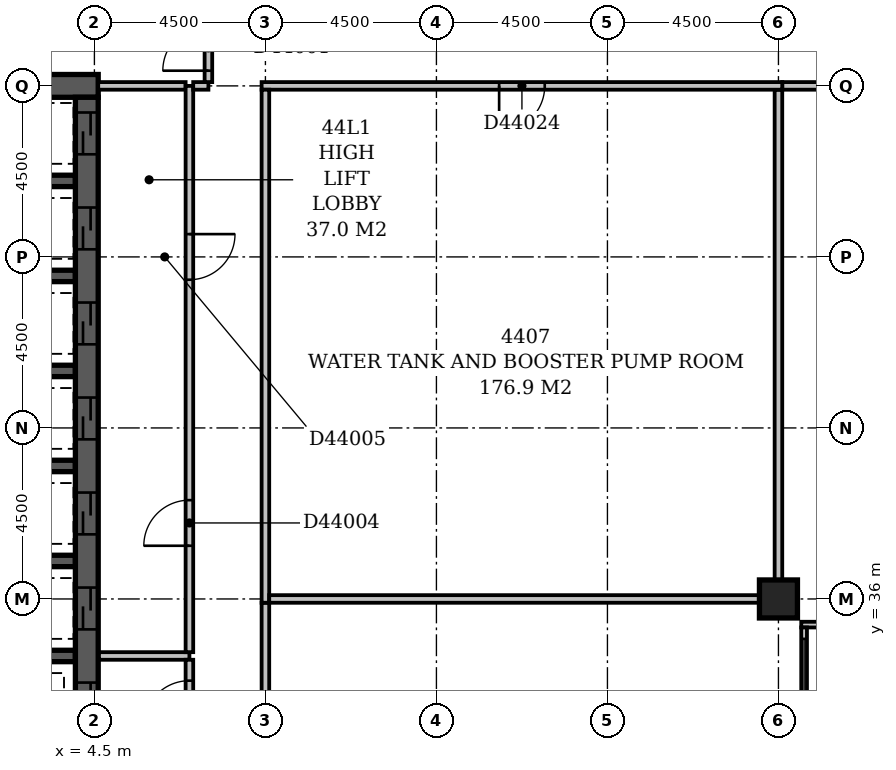
"""IFC4 building model, lengths in metres.
Left out: names, types, materials, properties, quantities, classifications, styles, units other than length and angle.
Written with IfcOpenShell. Run it as: python <this file> out.ifc"""

import sys

from ifc_helpers import new_model, si_unit, direction, frame, frame_2d, origin, origin_2d, place, context, subcontext, project, spatial, rectangle, extrude, element, fill, save


model = new_model("IFC4")
c1 = context("Model", 3, precision=1e-05, world=origin(), true_north=direction((0.0, 1.0)))
c2 = subcontext(c1, "Body", "Model", "MODEL_VIEW")
j1 = project(units=[si_unit("LENGTHUNIT", "METRE"), si_unit("PLANEANGLEUNIT", "RADIAN")], contexts=[c1])
p1 = place(None, origin())
s1 = spatial("IfcSite", under=j1, at=p1, CompositionType="ELEMENT")
p2 = place(p1, origin())
s2 = spatial("IfcBuilding", under=s1, at=p2, CompositionType="ELEMENT")
p3 = place(p2, frame((0.0, 0.0, 173.6)))
s3 = spatial("IfcBuildingStorey", under=s2, at=p3, CompositionType="ELEMENT", Elevation=173.6)
p4 = place(p3, frame((0.2, 49.5, -0.45), z_axis=(0.0, 0.0, 1.0), x_axis=(1.0, 0.0, 0.0)))
e1 = element("IfcWall", 1, at=p4, inside=s3, PredefinedType="SHEAR", context=c2, shape_type="SweptSolid", body=[
    extrude(rectangle(XDim=4.4, YDim=0.6, at=frame_2d((2.2, 0.0))), origin(), (0.0, 0.0, 1.0), 5.55),
])
for number, where, z_axis, x_axis in (
    (2, (0.8, 34.5, -0.45), (0.0, 0.0, 1.0), (1.0, 0.0, 0.0)),
    (3, (0.8, 37.0, -0.45), (0.0, 0.0, 1.0), (1.0, 0.0, 0.0)),
    (4, (0.8, 39.5, -0.45), (0.0, 0.0, 1.0), (1.0, 0.0, 0.0)),
    (5, (0.8, 42.0, -0.45), (0.0, 0.0, 1.0), (1.0, 0.0, 0.0)),
    (6, (0.8, 44.5, -0.45), (0.0, 0.0, 1.0), (1.0, 0.0, 0.0)),
    (7, (0.8, 47.0, -0.45), (0.0, 0.0, 1.0), (1.0, 0.0, 0.0)),
):
    element("IfcWall", number, at=place(p3, frame(where, z_axis=z_axis, x_axis=x_axis)), inside=s3, PredefinedType="SHEAR", context=c2, shape_type="SweptSolid", body=[
        extrude(rectangle(XDim=3.2, YDim=0.3, at=frame_2d((1.6, 0.0))), origin(), (0.0, 0.0, 1.0), 5.55),
    ])
p5 = place(p3, frame((4.3, 27.15, -0.45), z_axis=(0.0, 0.0, 1.0), x_axis=(0.0, 1.0, 0.0)))
e8 = element("IfcWall", 8, at=p5, inside=s3, PredefinedType="SHEAR", context=c2, shape_type="SweptSolid", body=[
    extrude(rectangle(XDim=22.05, YDim=0.6, at=frame_2d((11.025, 0.0))), origin(), (0.0, 0.0, 1.0), 5.55),
])
p6 = place(p5, frame((3.05, 0.0, 0.45)))
e9 = element("IfcOpeningElement", 9, at=p6, cuts=e8, PredefinedType="OPENING", context=c2, shape_type="SweptSolid", body=[
    extrude(rectangle(XDim=1.1, YDim=2.1, at=frame_2d((0.55, 1.05))), frame((0.0, 0.312, 0.0), z_axis=(0.0, -1.0, 0.0), x_axis=(1.0, 0.0, 0.0)), (0.0, 0.0, 1.0), 0.624),
])
p7 = place(p5, frame((0.55, 0.0, 0.45)))
e10 = element("IfcOpeningElement", 10, at=p7, cuts=e8, PredefinedType="OPENING", context=c2, shape_type="SweptSolid", body=[
    extrude(rectangle(XDim=1.1, YDim=2.1, at=frame_2d((0.55, 1.05))), frame((0.0, 0.312, 0.0), z_axis=(0.0, -1.0, 0.0), x_axis=(1.0, 0.0, 0.0)), (0.0, 0.0, 1.0), 0.624),
])
p8 = place(p5, frame((20.55, 0.0, 0.45)))
e11 = element("IfcOpeningElement", 11, at=p8, cuts=e8, PredefinedType="OPENING", context=c2, shape_type="SweptSolid", body=[
    extrude(rectangle(XDim=1.1, YDim=2.1, at=frame_2d((0.55, 1.05))), frame((0.0, 0.312, 0.0), z_axis=(0.0, -1.0, 0.0), x_axis=(1.0, 0.0, 0.0)), (0.0, 0.0, 1.0), 0.624),
])
p9 = place(p5, frame((18.05, 0.0, 0.45)))
e12 = element("IfcOpeningElement", 12, at=p9, cuts=e8, PredefinedType="OPENING", context=c2, shape_type="SweptSolid", body=[
    extrude(rectangle(XDim=1.1, YDim=2.1, at=frame_2d((0.55, 1.05))), frame((0.0, 0.312, 0.0), z_axis=(0.0, -1.0, 0.0), x_axis=(1.0, 0.0, 0.0)), (0.0, 0.0, 1.0), 0.624),
])
p10 = place(p5, frame((15.55, 0.0, 0.45)))
e13 = element("IfcOpeningElement", 13, at=p10, cuts=e8, PredefinedType="OPENING", context=c2, shape_type="SweptSolid", body=[
    extrude(rectangle(XDim=1.1, YDim=2.1, at=frame_2d((0.55, 1.05))), frame((0.0, 0.312, 0.0), z_axis=(0.0, -1.0, 0.0), x_axis=(1.0, 0.0, 0.0)), (0.0, 0.0, 1.0), 0.624),
])
p11 = place(p5, frame((13.05, 0.0, 0.45)))
e14 = element("IfcOpeningElement", 14, at=p11, cuts=e8, PredefinedType="OPENING", context=c2, shape_type="SweptSolid", body=[
    extrude(rectangle(XDim=1.1, YDim=2.1, at=frame_2d((0.55, 1.05))), frame((0.0, 0.312, 0.0), z_axis=(0.0, -1.0, 0.0), x_axis=(1.0, 0.0, 0.0)), (0.0, 0.0, 1.0), 0.624),
])
p12 = place(p5, frame((10.55, 0.0, 0.45)))
e15 = element("IfcOpeningElement", 15, at=p12, cuts=e8, PredefinedType="OPENING", context=c2, shape_type="SweptSolid", body=[
    extrude(rectangle(XDim=1.1, YDim=2.1, at=frame_2d((0.55, 1.05))), frame((0.0, 0.312, 0.0), z_axis=(0.0, -1.0, 0.0), x_axis=(1.0, 0.0, 0.0)), (0.0, 0.0, 1.0), 0.624),
])
p13 = place(p5, frame((8.05, 0.0, 0.45)))
e16 = element("IfcOpeningElement", 16, at=p13, cuts=e8, PredefinedType="OPENING", context=c2, shape_type="SweptSolid", body=[
    extrude(rectangle(XDim=1.1, YDim=2.1, at=frame_2d((0.55, 1.05))), frame((0.0, 0.312, 0.0), z_axis=(0.0, -1.0, 0.0), x_axis=(1.0, 0.0, 0.0)), (0.0, 0.0, 1.0), 0.624),
])
p14 = place(p5, frame((5.55, 0.0, 0.45)))
e17 = element("IfcOpeningElement", 17, at=p14, cuts=e8, PredefinedType="OPENING", context=c2, shape_type="SweptSolid", body=[
    extrude(rectangle(XDim=1.1, YDim=2.1, at=frame_2d((0.55, 1.05))), frame((0.0, 0.312, 0.0), z_axis=(0.0, -1.0, 0.0), x_axis=(1.0, 0.0, 0.0)), (0.0, 0.0, 1.0), 0.624),
])
p15 = place(p3, frame((22.5, 36.0, -0.45), z_axis=(0.0, 0.0, 1.0), x_axis=(1.0, 0.0, 0.0)))
e18 = element("IfcColumn", 18, at=p15, inside=s3, PredefinedType="COLUMN", context=c2, shape_type="SweptSolid", body=[
    extrude(rectangle(XDim=1.0, YDim=1.0, at=origin_2d()), origin(), (0.0, 0.0, 1.0), 5.55),
])
p16 = place(p3, frame((23.175, 17.4, 0.0), z_axis=(0.0, 0.0, 1.0), x_axis=(0.0, 1.0, 0.0)))
e19 = element("IfcWall", 19, at=p16, inside=s3, PredefinedType="STANDARD", context=c2, shape_type="SweptSolid", body=[
    extrude(rectangle(XDim=17.85, YDim=0.15, at=frame_2d((8.925, 0.0))), origin(), (0.0, 0.0, 1.0), 4.5),
])
p17 = place(p16, frame((3.775, 0.0, 0.6)))
e20 = element("IfcOpeningElement", 20, at=p17, cuts=e19, PredefinedType="OPENING", context=c2, shape_type="SweptSolid", body=[
    extrude(rectangle(XDim=0.6, YDim=2.4, at=frame_2d((0.3, 1.2))), frame((0.0, 0.087, 0.0), z_axis=(0.0, -1.0, 0.0), x_axis=(1.0, 0.0, 0.0)), (0.0, 0.0, 1.0), 0.174),
])
p18 = place(p16, frame((5.884, 0.0, 0.6)))
e21 = element("IfcOpeningElement", 21, at=p18, cuts=e19, PredefinedType="OPENING", context=c2, shape_type="SweptSolid", body=[
    extrude(rectangle(XDim=0.9, YDim=2.4, at=frame_2d((0.45, 1.2))), frame((0.0, 0.087, 0.0), z_axis=(0.0, -1.0, 0.0), x_axis=(1.0, 0.0, 0.0)), (0.0, 0.0, 1.0), 0.174),
])
p19 = place(p16, frame((12.775, 0.0, 0.6)))
e22 = element("IfcOpeningElement", 22, at=p19, cuts=e19, PredefinedType="OPENING", context=c2, shape_type="SweptSolid", body=[
    extrude(rectangle(XDim=0.6, YDim=2.4, at=frame_2d((0.3, 1.2))), frame((0.0, 0.087, 0.0), z_axis=(0.0, -1.0, 0.0), x_axis=(1.0, 0.0, 0.0)), (0.0, 0.0, 1.0), 0.174),
])
p20 = place(p16, frame((15.15, 0.0, 0.6)))
e23 = element("IfcOpeningElement", 23, at=p20, cuts=e19, PredefinedType="OPENING", context=c2, shape_type="SweptSolid", body=[
    extrude(rectangle(XDim=2.4, YDim=2.4, at=frame_2d((1.2, 1.2))), frame((0.0, 0.087, 0.0), z_axis=(0.0, -1.0, 0.0), x_axis=(1.0, 0.0, 0.0)), (0.0, 0.0, 1.0), 0.174),
])
p21 = place(p3, frame((23.1, 35.325, 0.0), z_axis=(0.0, 0.0, 1.0), x_axis=(1.0, 0.0, 0.0)))
e24 = element("IfcWall", 24, at=p21, inside=s3, PredefinedType="STANDARD", context=c2, shape_type="SweptSolid", body=[
    extrude(rectangle(XDim=45.15, YDim=0.15, at=frame_2d((22.575, 0.0))), origin(), (0.0, 0.0, 1.0), 4.5),
])
p22 = place(p21, frame((2.575, 0.0, 0.6)))
e25 = element("IfcOpeningElement", 25, at=p22, cuts=e24, PredefinedType="OPENING", context=c2, shape_type="SweptSolid", body=[
    extrude(rectangle(XDim=0.6, YDim=2.4, at=frame_2d((0.3, 1.2))), frame((0.0, 0.087, 0.0), z_axis=(0.0, -1.0, 0.0), x_axis=(1.0, 0.0, 0.0)), (0.0, 0.0, 1.0), 0.174),
])
p23 = place(p21, frame((6.781, 0.0, 0.6)))
e26 = element("IfcOpeningElement", 26, at=p23, cuts=e24, PredefinedType="OPENING", context=c2, shape_type="SweptSolid", body=[
    extrude(rectangle(XDim=0.9, YDim=2.4, at=frame_2d((0.45, 1.2))), frame((0.0, 0.087, 0.0), z_axis=(0.0, -1.0, 0.0), x_axis=(1.0, 0.0, 0.0)), (0.0, 0.0, 1.0), 0.174),
])
p24 = place(p21, frame((11.575, 0.0, 0.6)))
e27 = element("IfcOpeningElement", 27, at=p24, cuts=e24, PredefinedType="OPENING", context=c2, shape_type="SweptSolid", body=[
    extrude(rectangle(XDim=0.6, YDim=2.4, at=frame_2d((0.3, 1.2))), frame((0.0, 0.087, 0.0), z_axis=(0.0, -1.0, 0.0), x_axis=(1.0, 0.0, 0.0)), (0.0, 0.0, 1.0), 0.174),
])
p25 = place(p21, frame((13.95, 0.0, 0.6)))
e28 = element("IfcOpeningElement", 28, at=p25, cuts=e24, PredefinedType="OPENING", context=c2, shape_type="SweptSolid", body=[
    extrude(rectangle(XDim=2.4, YDim=2.4, at=frame_2d((1.2, 1.2))), frame((0.0, 0.087, 0.0), z_axis=(0.0, -1.0, 0.0), x_axis=(1.0, 0.0, 0.0)), (0.0, 0.0, 1.0), 0.174),
])
p26 = place(p21, frame((22.95, 0.0, 0.6)))
e29 = element("IfcOpeningElement", 29, at=p26, cuts=e24, PredefinedType="OPENING", context=c2, shape_type="SweptSolid", body=[
    extrude(rectangle(XDim=2.4, YDim=2.4, at=frame_2d((1.2, 1.2))), frame((0.0, 0.087, 0.0), z_axis=(0.0, -1.0, 0.0), x_axis=(1.0, 0.0, 0.0)), (0.0, 0.0, 1.0), 0.174),
])
p27 = place(p21, frame((29.575, 0.0, 0.6)))
e30 = element("IfcOpeningElement", 30, at=p27, cuts=e24, PredefinedType="OPENING", context=c2, shape_type="SweptSolid", body=[
    extrude(rectangle(XDim=0.6, YDim=2.4, at=frame_2d((0.3, 1.2))), frame((0.0, 0.087, 0.0), z_axis=(0.0, -1.0, 0.0), x_axis=(1.0, 0.0, 0.0)), (0.0, 0.0, 1.0), 0.174),
])
p28 = place(p21, frame((31.716, 0.0, 0.6)))
e31 = element("IfcOpeningElement", 31, at=p28, cuts=e24, PredefinedType="OPENING", context=c2, shape_type="SweptSolid", body=[
    extrude(rectangle(XDim=1.2, YDim=2.4, at=frame_2d((0.6, 1.2))), frame((0.0, 0.087, 0.0), z_axis=(0.0, -1.0, 0.0), x_axis=(1.0, 0.0, 0.0)), (0.0, 0.0, 1.0), 0.174),
])
p29 = place(p21, frame((38.575, 0.0, 0.6)))
e32 = element("IfcOpeningElement", 32, at=p29, cuts=e24, PredefinedType="OPENING", context=c2, shape_type="SweptSolid", body=[
    extrude(rectangle(XDim=0.6, YDim=2.4, at=frame_2d((0.3, 1.2))), frame((0.0, 0.087, 0.0), z_axis=(0.0, -1.0, 0.0), x_axis=(1.0, 0.0, 0.0)), (0.0, 0.0, 1.0), 0.174),
])
p30 = place(p21, frame((40.95, 0.0, 0.6)))
e33 = element("IfcOpeningElement", 33, at=p30, cuts=e24, PredefinedType="OPENING", context=c2, shape_type="SweptSolid", body=[
    extrude(rectangle(XDim=2.4, YDim=2.4, at=frame_2d((1.2, 1.2))), frame((0.0, 0.087, 0.0), z_axis=(0.0, -1.0, 0.0), x_axis=(1.0, 0.0, 0.0)), (0.0, 0.0, 1.0), 0.174),
])
p31 = place(p3, frame((4.62, 34.5, 0.0), z_axis=(0.0, 0.0, 1.0), x_axis=(1.0, 0.0, 0.0)))
e34 = element("IfcWall", 34, at=p31, inside=s3, PredefinedType="PARTITIONING", context=c2, shape_type="SweptSolid", body=[
    extrude(rectangle(XDim=2.38, YDim=0.2, at=frame_2d((1.19, 0.0))), origin(), (0.0, 0.0, 1.0), 5.1),
])
p32 = place(p3, frame((7.0, 34.6, 0.0), z_axis=(0.0, 0.0, 1.0), x_axis=(0.0, 1.0, 0.0)))
e35 = element("IfcWall", 35, at=p32, inside=s3, PredefinedType="PARTITIONING", context=c2, shape_type="SweptSolid", body=[
    extrude(rectangle(XDim=14.9, YDim=0.2, at=frame_2d((7.45, 0.0))), origin(), (0.0, 0.0, 1.0), 5.1),
])
p33 = place(p32, frame((2.8, 0.0, 0.0)))
e36 = element("IfcOpeningElement", 36, at=p33, cuts=e35, PredefinedType="OPENING", context=c2, shape_type="SweptSolid", body=[
    extrude(rectangle(XDim=1.2, YDim=2.1, at=frame_2d((0.6, 1.05))), frame((0.0, 0.112, 0.0), z_axis=(0.0, -1.0, 0.0), x_axis=(1.0, 0.0, 0.0)), (0.0, 0.0, 1.0), 0.224),
])
p34 = place(p32, frame((9.8, 0.0, 0.0)))
e37 = element("IfcOpeningElement", 37, at=p34, cuts=e35, PredefinedType="OPENING", context=c2, shape_type="SweptSolid", body=[
    extrude(rectangle(XDim=1.2, YDim=2.1, at=frame_2d((0.6, 1.05))), frame((0.0, 0.112, 0.0), z_axis=(0.0, -1.0, 0.0), x_axis=(1.0, 0.0, 0.0)), (0.0, 0.0, 1.0), 0.224),
])
p35 = place(p3, frame((4.6, 49.5, 0.0), z_axis=(0.0, 0.0, 1.0), x_axis=(1.0, 0.0, 0.0)))
e38 = element("IfcWall", 38, at=p35, inside=s3, PredefinedType="PARTITIONING", context=c2, shape_type="SweptSolid", body=[
    extrude(rectangle(XDim=2.3, YDim=0.2, at=frame_2d((1.15, 0.0))), origin(), (0.0, 0.0, 1.0), 5.1),
])
p36 = place(p3, frame((7.0, 32.1, 0.0), z_axis=(0.0, 0.0, 1.0), x_axis=(0.0, 1.0, 0.0)))
e39 = element("IfcWall", 39, at=p36, inside=s3, PredefinedType="PARTITIONING", context=c2, shape_type="SweptSolid", body=[
    extrude(rectangle(XDim=2.3, YDim=0.2, at=frame_2d((1.15, 0.0))), origin(), (0.0, 0.0, 1.0), 5.1),
])
p37 = place(p36, frame((0.55, 0.0, 0.0)))
e40 = element("IfcOpeningElement", 40, at=p37, cuts=e39, PredefinedType="OPENING", context=c2, shape_type="SweptSolid", body=[
    extrude(rectangle(XDim=1.2, YDim=2.1, at=frame_2d((0.6, 1.05))), frame((0.0, 0.112, 0.0), z_axis=(0.0, -1.0, 0.0), x_axis=(1.0, 0.0, 0.0)), (0.0, 0.0, 1.0), 0.224),
])
p38 = place(p3, frame((7.1, 49.5, 0.0), z_axis=(0.0, 0.0, 1.0), x_axis=(1.0, 0.0, 0.0)))
e41 = element("IfcWall", 41, at=p38, inside=s3, PredefinedType="PARTITIONING", context=c2, shape_type="SweptSolid", body=[
    extrude(rectangle(XDim=0.4, YDim=0.2, at=frame_2d((0.2, 0.0))), origin(), (0.0, 0.0, 1.0), 5.1),
])
p39 = place(p3, frame((7.5, 49.6, 0.0), z_axis=(0.0, 0.0, 1.0), x_axis=(0.0, 1.0, 0.0)))
e42 = element("IfcWall", 42, at=p39, inside=s3, PredefinedType="PARTITIONING", context=c2, shape_type="SweptSolid", body=[
    extrude(rectangle(XDim=3.9, YDim=0.2, at=frame_2d((1.95, 0.0))), origin(), (0.0, 0.0, 1.0), 5.1),
])
p40 = place(p39, frame((0.3, 0.0, 0.0)))
e43 = element("IfcOpeningElement", 43, at=p40, cuts=e42, PredefinedType="OPENING", context=c2, shape_type="SweptSolid", body=[
    extrude(rectangle(XDim=1.2, YDim=2.1, at=frame_2d((0.6, 1.05))), frame((0.0, 0.112, 0.0), z_axis=(0.0, -1.0, 0.0), x_axis=(1.0, 0.0, 0.0)), (0.0, 0.0, 1.0), 0.224),
])
p41 = place(p3, frame((9.0, 18.49, 0.0), z_axis=(0.0, 0.0, 1.0), x_axis=(0.0, 1.0, 0.0)))
e44 = element("IfcWall", 44, at=p41, inside=s3, PredefinedType="PARTITIONING", context=c2, shape_type="SweptSolid", body=[
    extrude(rectangle(XDim=17.409, YDim=0.2, at=frame_2d((8.705, 0.0))), origin(), (0.0, 0.0, 1.0), 5.1),
])
p42 = place(p41, frame((9.155, 0.0, 0.0)))
e45 = element("IfcOpeningElement", 45, at=p42, cuts=e44, PredefinedType="OPENING", context=c2, shape_type="SweptSolid", body=[
    extrude(rectangle(XDim=1.2, YDim=2.1, at=frame_2d((0.6, 1.05))), frame((0.0, 0.112, 0.0), z_axis=(0.0, -1.0, 0.0), x_axis=(1.0, 0.0, 0.0)), (0.0, 0.0, 1.0), 0.224),
])
p43 = place(p3, frame((9.1, 36.0, 0.0), z_axis=(0.0, 0.0, 1.0), x_axis=(1.0, 0.0, 0.0)))
e46 = element("IfcWall", 46, at=p43, inside=s3, PredefinedType="PARTITIONING", context=c2, shape_type="SweptSolid", body=[
    extrude(rectangle(XDim=13.208, YDim=0.2, at=frame_2d((6.604, 0.0))), origin(), (0.0, 0.0, 1.0), 5.1),
])
p44 = place(p3, frame((9.0, 35.9, 0.0), z_axis=(0.0, 0.0, 1.0), x_axis=(0.0, 1.0, 0.0)))
e47 = element("IfcWall", 47, at=p44, inside=s3, PredefinedType="PARTITIONING", context=c2, shape_type="SweptSolid", body=[
    extrude(rectangle(XDim=13.5, YDim=0.2, at=frame_2d((6.75, 0.0))), origin(), (0.0, 0.0, 1.0), 5.1),
])
p45 = place(p3, frame((22.5, 36.191, 0.0), z_axis=(0.0, 0.0, 1.0), x_axis=(0.0, 1.0, 0.0)))
e48 = element("IfcWall", 48, at=p45, inside=s3, PredefinedType="PARTITIONING", context=c2, shape_type="SweptSolid", body=[
    extrude(rectangle(XDim=13.208, YDim=0.2, at=frame_2d((6.604, 0.0))), origin(), (0.0, 0.0, 1.0), 5.1),
])
p46 = place(p3, frame((8.9, 49.5, 0.0), z_axis=(0.0, 0.0, 1.0), x_axis=(1.0, 0.0, 0.0)))
e49 = element("IfcWall", 49, at=p46, inside=s3, PredefinedType="PARTITIONING", context=c2, shape_type="SweptSolid", body=[
    extrude(rectangle(XDim=13.7, YDim=0.2, at=frame_2d((6.85, 0.0))), origin(), (0.0, 0.0, 1.0), 5.1),
])
p47 = place(p46, frame((6.25, 0.0, 0.0)))
e50 = element("IfcOpeningElement", 50, at=p47, cuts=e49, PredefinedType="OPENING", context=c2, shape_type="SweptSolid", body=[
    extrude(rectangle(XDim=1.2, YDim=2.1, at=frame_2d((0.6, 1.05))), frame((0.0, 0.112, 0.0), z_axis=(0.0, -1.0, 0.0), x_axis=(1.0, 0.0, 0.0)), (0.0, 0.0, 1.0), 0.224),
])
p48 = place(p3, frame((22.6, 49.5, 0.0), z_axis=(0.0, 0.0, 1.0), x_axis=(1.0, 0.0, 0.0)))
e51 = element("IfcWall", 51, at=p48, inside=s3, PredefinedType="PARTITIONING", context=c2, shape_type="SweptSolid", body=[
    extrude(rectangle(XDim=13.208, YDim=0.2, at=frame_2d((6.604, 0.0))), origin(), (0.0, 0.0, 1.0), 5.1),
])
p49 = place(p48, frame((6.004, 0.0, 0.0)))
e52 = element("IfcOpeningElement", 52, at=p49, cuts=e51, PredefinedType="OPENING", context=c2, shape_type="SweptSolid", body=[
    extrude(rectangle(XDim=1.2, YDim=2.1, at=frame_2d((0.6, 1.05))), frame((0.0, 0.112, 0.0), z_axis=(0.0, -1.0, 0.0), x_axis=(1.0, 0.0, 0.0)), (0.0, 0.0, 1.0), 0.224),
])
p50 = place(p20, origin())
e53 = element("IfcWindow", 53, at=p50, inside=s3, PartitioningType="SINGLE_PANEL", PredefinedType="USERDEFINED", context=c2, shape_type="SweptSolid", body=[
    extrude(rectangle(XDim=2.4, YDim=2.4, at=frame_2d((1.2, 1.2))), frame((0.0, 0.03, 0.0), z_axis=(0.0, -1.0, 0.0), x_axis=(1.0, 0.0, 0.0)), (0.0, 0.0, 1.0), 0.06),
])
fill(e23, e53)
p51 = place(p40, origin())
e54 = element("IfcDoor", 54, at=p51, inside=s3, OperationType="SINGLE_SWING_LEFT", PredefinedType="DOOR", context=c2, shape_type="SweptSolid", body=[
    extrude(rectangle(XDim=1.2, YDim=2.1, at=frame_2d((0.6, 1.05))), frame((0.0, 0.025, 0.0), z_axis=(0.0, -1.0, 0.0), x_axis=(1.0, 0.0, 0.0)), (0.0, 0.0, 1.0), 0.05),
])
fill(e43, e54)
p52 = place(p8, origin())
e55 = element("IfcDoor", 55, at=p52, inside=s3, OperationType="SLIDING_TO_LEFT", PredefinedType="DOOR", context=c2, shape_type="SweptSolid", body=[
    extrude(rectangle(XDim=1.1, YDim=2.1, at=frame_2d((0.55, 1.05))), frame((0.0, 0.025, 0.0), z_axis=(0.0, -1.0, 0.0), x_axis=(1.0, 0.0, 0.0)), (0.0, 0.0, 1.0), 0.05),
])
fill(e11, e55)
p53 = place(p9, origin())
e56 = element("IfcDoor", 56, at=p53, inside=s3, OperationType="SLIDING_TO_LEFT", PredefinedType="DOOR", context=c2, shape_type="SweptSolid", body=[
    extrude(rectangle(XDim=1.1, YDim=2.1, at=frame_2d((0.55, 1.05))), frame((0.0, 0.025, 0.0), z_axis=(0.0, -1.0, 0.0), x_axis=(1.0, 0.0, 0.0)), (0.0, 0.0, 1.0), 0.05),
])
fill(e12, e56)
p54 = place(p10, origin())
e57 = element("IfcDoor", 57, at=p54, inside=s3, OperationType="SLIDING_TO_LEFT", PredefinedType="DOOR", context=c2, shape_type="SweptSolid", body=[
    extrude(rectangle(XDim=1.1, YDim=2.1, at=frame_2d((0.55, 1.05))), frame((0.0, 0.025, 0.0), z_axis=(0.0, -1.0, 0.0), x_axis=(1.0, 0.0, 0.0)), (0.0, 0.0, 1.0), 0.05),
])
fill(e13, e57)
p55 = place(p11, origin())
e58 = element("IfcDoor", 58, at=p55, inside=s3, OperationType="SLIDING_TO_LEFT", PredefinedType="DOOR", context=c2, shape_type="SweptSolid", body=[
    extrude(rectangle(XDim=1.1, YDim=2.1, at=frame_2d((0.55, 1.05))), frame((0.0, 0.025, 0.0), z_axis=(0.0, -1.0, 0.0), x_axis=(1.0, 0.0, 0.0)), (0.0, 0.0, 1.0), 0.05),
])
fill(e14, e58)
p56 = place(p12, origin())
e59 = element("IfcDoor", 59, at=p56, inside=s3, OperationType="SLIDING_TO_LEFT", PredefinedType="DOOR", context=c2, shape_type="SweptSolid", body=[
    extrude(rectangle(XDim=1.1, YDim=2.1, at=frame_2d((0.55, 1.05))), frame((0.0, 0.025, 0.0), z_axis=(0.0, -1.0, 0.0), x_axis=(1.0, 0.0, 0.0)), (0.0, 0.0, 1.0), 0.05),
])
fill(e15, e59)
p57 = place(p13, origin())
e60 = element("IfcDoor", 60, at=p57, inside=s3, OperationType="SLIDING_TO_LEFT", PredefinedType="DOOR", context=c2, shape_type="SweptSolid", body=[
    extrude(rectangle(XDim=1.1, YDim=2.1, at=frame_2d((0.55, 1.05))), frame((0.0, 0.025, 0.0), z_axis=(0.0, -1.0, 0.0), x_axis=(1.0, 0.0, 0.0)), (0.0, 0.0, 1.0), 0.05),
])
fill(e16, e60)
p58 = place(p33, origin())
e61 = element("IfcDoor", 61, at=p58, inside=s3, OperationType="SINGLE_SWING_LEFT", PredefinedType="DOOR", context=c2, shape_type="SweptSolid", body=[
    extrude(rectangle(XDim=1.2, YDim=2.1, at=frame_2d((0.6, 1.05))), frame((0.0, 0.025, 0.0), z_axis=(0.0, -1.0, 0.0), x_axis=(1.0, 0.0, 0.0)), (0.0, 0.0, 1.0), 0.05),
])
fill(e36, e61)
p59 = place(p34, origin())
e62 = element("IfcDoor", 62, at=p59, inside=s3, OperationType="SINGLE_SWING_RIGHT", PredefinedType="DOOR", context=c2, shape_type="SweptSolid", body=[
    extrude(rectangle(XDim=1.2, YDim=2.1, at=frame_2d((0.6, 1.05))), frame((0.0, 0.025, 0.0), z_axis=(0.0, -1.0, 0.0), x_axis=(1.0, 0.0, 0.0)), (0.0, 0.0, 1.0), 0.05),
])
fill(e37, e62)
p60 = place(p37, origin())
e63 = element("IfcDoor", 63, at=p60, inside=s3, OperationType="SINGLE_SWING_LEFT", PredefinedType="DOOR", context=c2, shape_type="SweptSolid", body=[
    extrude(rectangle(XDim=1.2, YDim=2.1, at=frame_2d((0.6, 1.05))), frame((0.0, 0.025, 0.0), z_axis=(0.0, -1.0, 0.0), x_axis=(1.0, 0.0, 0.0)), (0.0, 0.0, 1.0), 0.05),
])
fill(e40, e63)
p61 = place(p14, origin())
e64 = element("IfcDoor", 64, at=p61, inside=s3, OperationType="SLIDING_TO_LEFT", PredefinedType="DOOR", context=c2, shape_type="SweptSolid", body=[
    extrude(rectangle(XDim=1.1, YDim=2.1, at=frame_2d((0.55, 1.05))), frame((0.0, 0.025, 0.0), z_axis=(0.0, -1.0, 0.0), x_axis=(1.0, 0.0, 0.0)), (0.0, 0.0, 1.0), 0.05),
])
fill(e17, e64)
p62 = place(p47, frame((1.2, 0.0, 0.0), z_axis=(0.0, 0.0, 1.0), x_axis=(-1.0, 0.0, 0.0)))
e65 = element("IfcDoor", 65, at=p62, inside=s3, OperationType="SINGLE_SWING_RIGHT", PredefinedType="DOOR", context=c2, shape_type="SweptSolid", body=[
    extrude(rectangle(XDim=1.2, YDim=2.1, at=frame_2d((0.6, 1.05))), frame((0.0, 0.025, 0.0), z_axis=(0.0, -1.0, 0.0), x_axis=(1.0, 0.0, 0.0)), (0.0, 0.0, 1.0), 0.05),
])
fill(e50, e65)
save(model, sys.argv[1])
